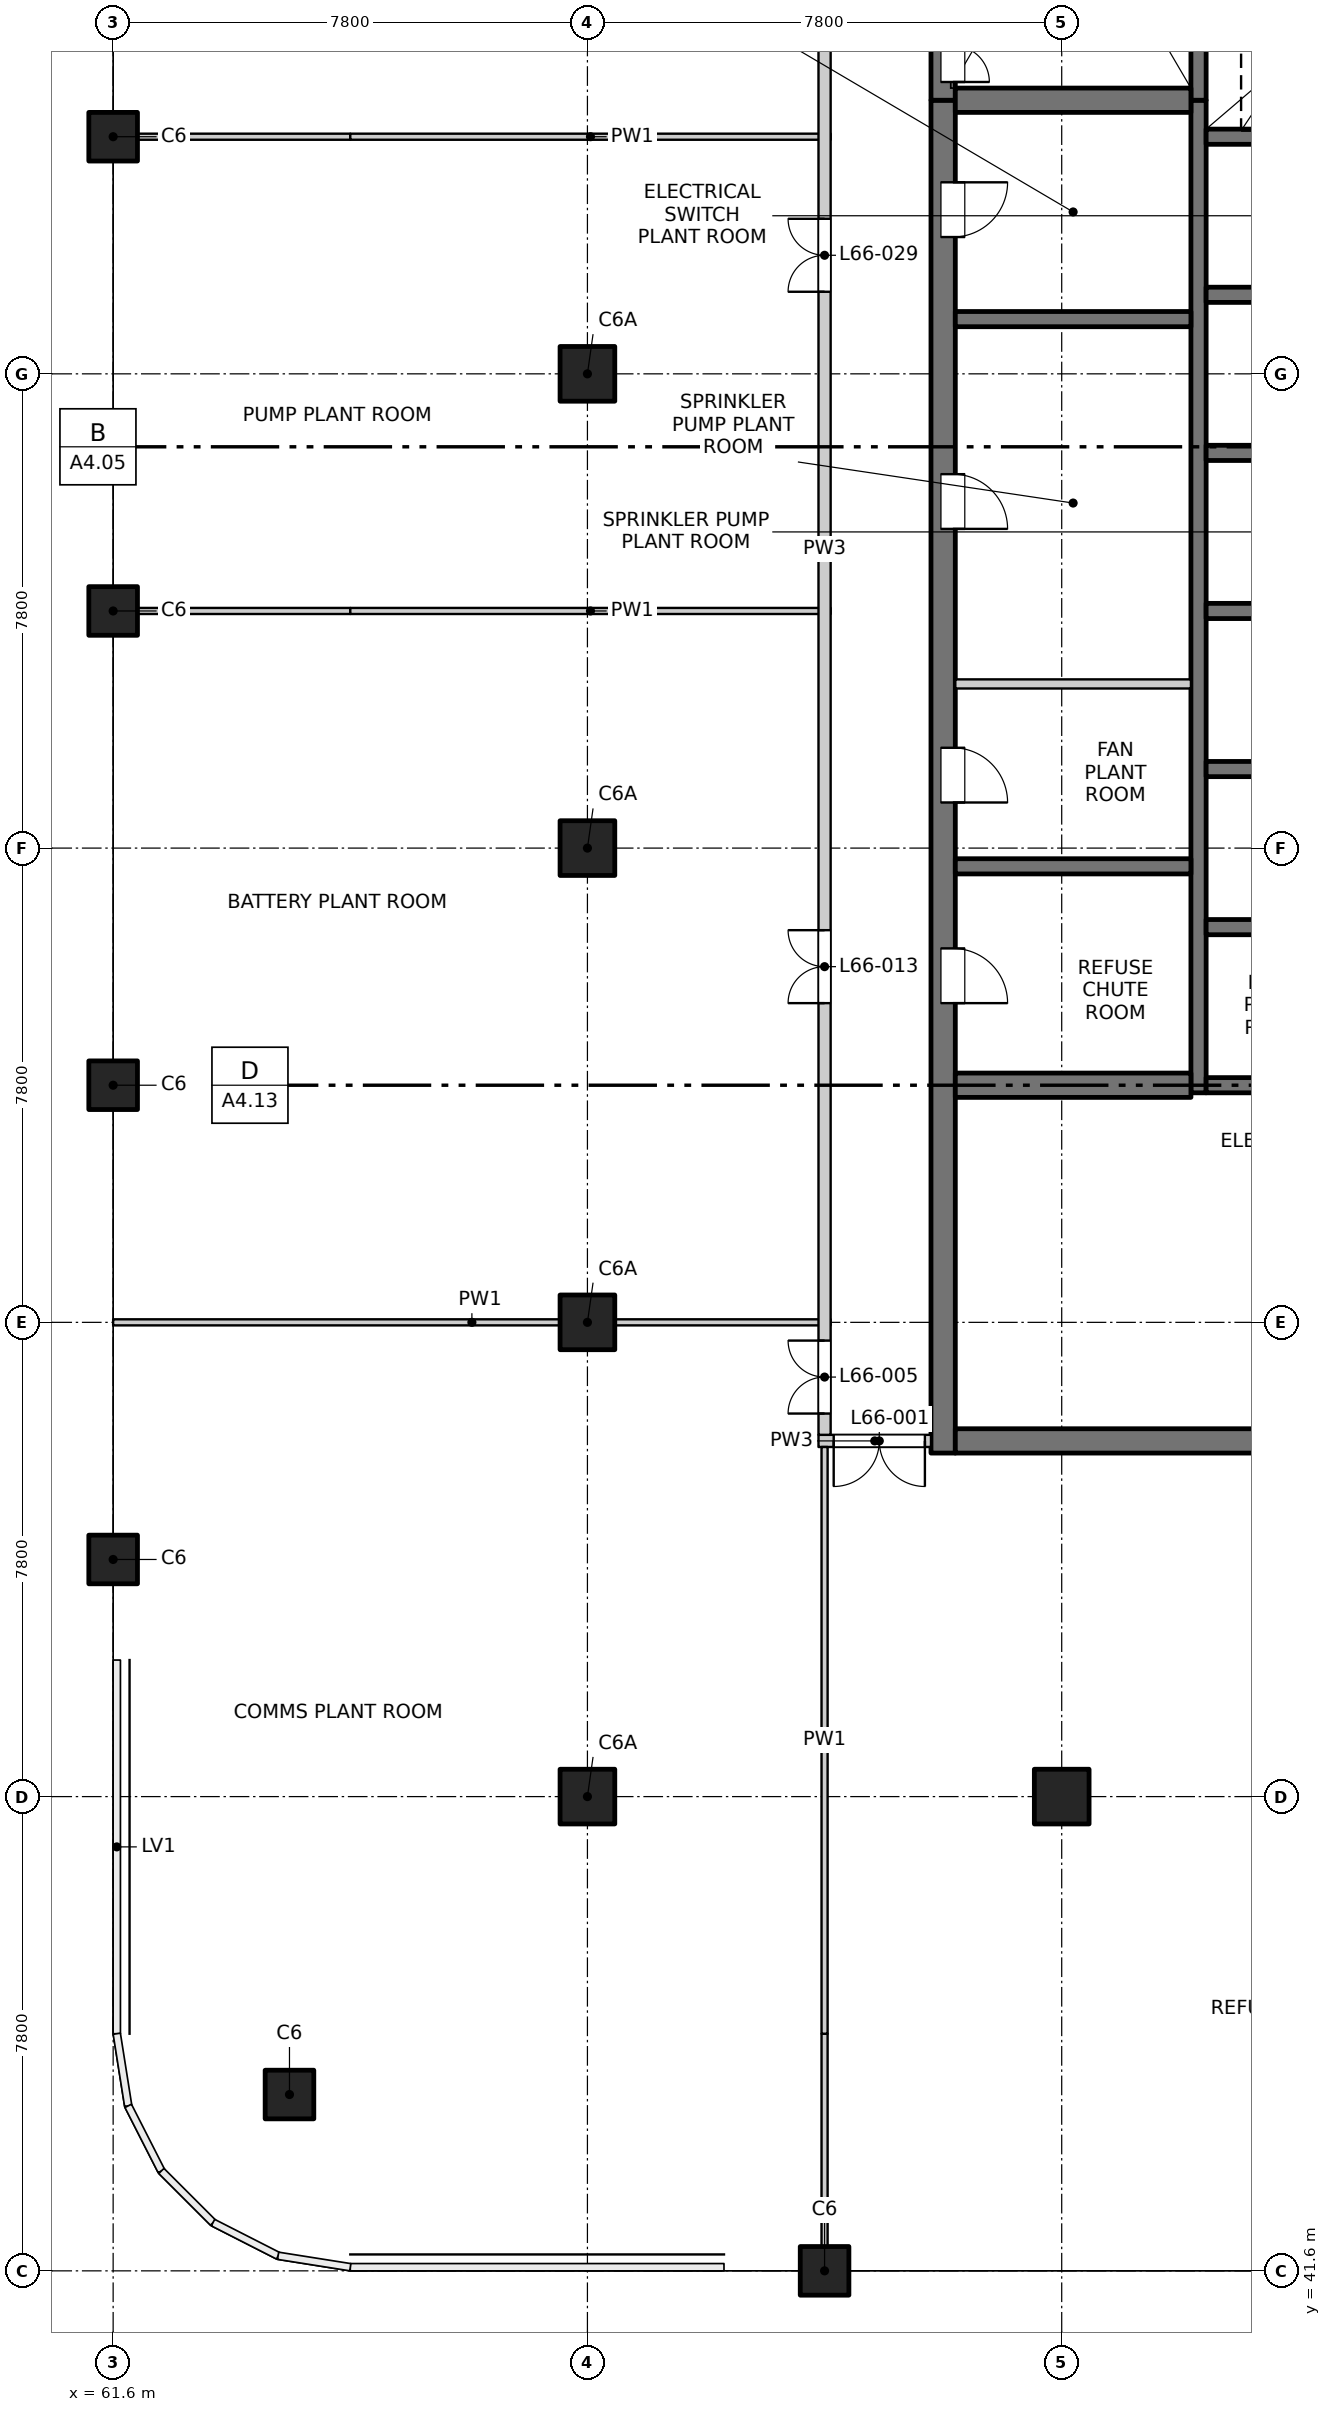
"""IFC4 building model, lengths in metres.
Left out: names, types, materials, properties, quantities, classifications, styles, units other than length and angle.
Written with IfcOpenShell. Run it as: python <this file> out.ifc"""

import sys

from ifc_helpers import new_model, si_unit, direction, frame, frame_2d, origin, origin_2d, place, context, subcontext, project, spatial, rectangle, extrude, element, fill, save


model = new_model("IFC4")
c1 = context("Model", 3, precision=1e-05, world=origin(), true_north=direction((0.0, 1.0)))
c2 = subcontext(c1, "Body", "Model", "MODEL_VIEW")
j1 = project(units=[si_unit("LENGTHUNIT", "METRE"), si_unit("PLANEANGLEUNIT", "RADIAN")], contexts=[c1])
p1 = place(None, origin())
s1 = spatial("IfcSite", under=j1, at=p1, CompositionType="ELEMENT")
p2 = place(p1, origin())
s2 = spatial("IfcBuilding", under=s1, at=p2, CompositionType="ELEMENT")
p3 = place(p2, frame((0.0, 0.0, 241.5)))
s3 = spatial("IfcBuildingStorey", under=s2, at=p3, CompositionType="ELEMENT", Elevation=241.5)
for number, where, z_axis, x_axis in (
    (1, (64.5, 44.5, -0.3), (0.0, 0.0, 1.0), (1.0, 0.0, 0.0)),
    (2, (61.6, 53.3, -0.3), (0.0, 0.0, 1.0), (1.0, 0.0, 0.0)),
    (3, (73.3, 41.6, -0.3), (0.0, 0.0, 1.0), (1.0, 0.0, 0.0)),
    (4, (61.6, 61.1, -0.3), (0.0, 0.0, 1.0), (1.0, 0.0, 0.0)),
    (5, (61.6, 68.9, -0.3), (0.0, 0.0, 1.0), (1.0, 0.0, 0.0)),
    (6, (61.6, 76.7, -0.3), (0.0, 0.0, 1.0), (1.0, 0.0, 0.0)),
):
    element("IfcColumn", number, at=place(p3, frame(where, z_axis=z_axis, x_axis=x_axis)), inside=s3, PredefinedType="COLUMN", context=c2, shape_type="SweptSolid", body=[
        extrude(rectangle(XDim=0.8, YDim=0.8, at=origin_2d()), origin(), (0.0, 0.0, 1.0), 4.5),
    ])
for number, where, z_axis, x_axis in (
    (7, (69.4, 49.4, -0.3), (0.0, 0.0, 1.0), (1.0, 0.0, 0.0)),
    (8, (69.4, 57.2, -0.3), (0.0, 0.0, 1.0), (1.0, 0.0, 0.0)),
    (9, (69.4, 65.0, -0.3), (0.0, 0.0, 1.0), (1.0, 0.0, 0.0)),
    (10, (69.4, 72.8, -0.3), (0.0, 0.0, 1.0), (1.0, 0.0, 0.0)),
    (11, (77.2, 49.4, -0.3), (0.0, 0.0, 1.0), (1.0, 0.0, 0.0)),
):
    element("IfcColumn", number, at=place(p3, frame(where, z_axis=z_axis, x_axis=x_axis)), inside=s3, PredefinedType="COLUMN", context=c2, shape_type="SweptSolid", body=[
        extrude(rectangle(XDim=0.9, YDim=0.9, at=origin_2d()), origin(), (0.0, 0.0, 1.0), 4.5),
    ])
p4 = place(p3, frame((75.25, 55.05, -0.3), z_axis=(0.0, 0.0, 1.0), x_axis=(0.0, 1.0, 0.0)))
e12 = element("IfcWall", 12, at=p4, inside=s3, PredefinedType="SOLIDWALL", context=c2, shape_type="SweptSolid", body=[
    extrude(rectangle(XDim=22.25, YDim=0.4, at=frame_2d((11.125, 0.0))), origin(), (0.0, 0.0, 1.0), 4.5),
])
p5 = place(p4, frame((7.4, 0.0, 0.3)))
e13 = element("IfcOpeningElement", 13, at=p5, cuts=e12, PredefinedType="OPENING", context=c2, shape_type="SweptSolid", body=[
    extrude(rectangle(XDim=0.9, YDim=2.1, at=frame_2d((0.45, 1.05))), frame((0.0, 0.21, 0.0), z_axis=(0.0, -1.0, 0.0), x_axis=(1.0, 0.0, 0.0)), (0.0, 0.0, 1.0), 0.42),
])
p6 = place(p4, frame((10.7, 0.0, 0.3)))
e14 = element("IfcOpeningElement", 14, at=p6, cuts=e12, PredefinedType="OPENING", context=c2, shape_type="SweptSolid", body=[
    extrude(rectangle(XDim=0.9, YDim=2.1, at=frame_2d((0.45, 1.05))), frame((0.0, 0.21, 0.0), z_axis=(0.0, -1.0, 0.0), x_axis=(1.0, 0.0, 0.0)), (0.0, 0.0, 1.0), 0.42),
])
p7 = place(p4, frame((15.2, 0.0, 0.3)))
e15 = element("IfcOpeningElement", 15, at=p7, cuts=e12, PredefinedType="OPENING", context=c2, shape_type="SweptSolid", body=[
    extrude(rectangle(XDim=0.9, YDim=2.1, at=frame_2d((0.45, 1.05))), frame((0.0, 0.21, 0.0), z_axis=(0.0, -1.0, 0.0), x_axis=(1.0, 0.0, 0.0)), (0.0, 0.0, 1.0), 0.42),
])
p8 = place(p4, frame((20.0, 0.0, 0.3)))
e16 = element("IfcOpeningElement", 16, at=p8, cuts=e12, PredefinedType="OPENING", context=c2, shape_type="SweptSolid", body=[
    extrude(rectangle(XDim=0.9, YDim=2.1, at=frame_2d((0.45, 1.05))), frame((0.0, 0.21, 0.0), z_axis=(0.0, -1.0, 0.0), x_axis=(1.0, 0.0, 0.0)), (0.0, 0.0, 1.0), 0.42),
])
p9 = place(p3, frame((75.25, 77.3, -0.3), z_axis=(0.0, 0.0, 1.0), x_axis=(0.0, 1.0, 0.0)))
e17 = element("IfcWall", 17, at=p9, inside=s3, PredefinedType="SOLIDWALL", context=c2, shape_type="SweptSolid", body=[
    extrude(rectangle(XDim=7.4, YDim=0.4, at=frame_2d((3.7, 0.0))), origin(), (0.0, 0.0, 1.0), 4.5),
])
p10 = place(p9, frame((0.3, 0.0, 0.3)))
e18 = element("IfcOpeningElement", 18, at=p10, cuts=e17, PredefinedType="OPENING", context=c2, shape_type="SweptSolid", body=[
    extrude(rectangle(XDim=1.2, YDim=2.1, at=frame_2d((0.6, 1.05))), frame((0.0, 0.21, 0.0), z_axis=(0.0, -1.0, 0.0), x_axis=(1.0, 0.0, 0.0)), (0.0, 0.0, 1.0), 0.42),
])
p11 = place(p3, frame((75.45, 55.25, -0.3), z_axis=(0.0, 0.0, 1.0), x_axis=(1.0, 0.0, 0.0)))
e19 = element("IfcWall", 19, at=p11, inside=s3, PredefinedType="SOLIDWALL", context=c2, shape_type="SweptSolid", body=[
    extrude(rectangle(XDim=19.1, YDim=0.4, at=frame_2d((9.55, 0.0))), origin(), (0.0, 0.0, 1.0), 4.5),
])
p12 = place(p11, frame((7.3, 0.0, 0.3)))
e20 = element("IfcOpeningElement", 20, at=p12, cuts=e19, PredefinedType="OPENING", context=c2, shape_type="SweptSolid", body=[
    extrude(rectangle(XDim=1.5, YDim=2.1, at=frame_2d((0.75, 1.05))), frame((0.0, 0.21, 0.0), z_axis=(0.0, -1.0, 0.0), x_axis=(1.0, 0.0, 0.0)), (0.0, 0.0, 1.0), 0.42),
])
p13 = place(p3, frame((79.45, 60.975, -0.3), z_axis=(0.0, 0.0, 1.0), x_axis=(0.0, 1.0, 0.0)))
e21 = element("IfcWall", 21, at=p13, inside=s3, PredefinedType="SOLIDWALL", context=c2, shape_type="SweptSolid", body=[
    extrude(rectangle(XDim=16.325, YDim=0.25, at=frame_2d((8.163, 0.0))), origin(), (0.0, 0.0, 1.0), 4.5),
])
p14 = place(p3, frame((79.45, 77.3, -0.3), z_axis=(0.0, 0.0, 1.0), x_axis=(0.0, 1.0, 0.0)))
e22 = element("IfcWall", 22, at=p14, inside=s3, PredefinedType="SOLIDWALL", context=c2, shape_type="SweptSolid", body=[
    extrude(rectangle(XDim=7.0, YDim=0.25, at=frame_2d((3.5, 0.0))), origin(), (0.0, 0.0, 1.0), 4.5),
])
for number, where, z_axis, x_axis in (
    (23, (79.575, 61.1, -0.3), (0.0, 0.0, 1.0), (1.0, 0.0, 0.0)),
    (24, (79.575, 63.7, -0.3), (0.0, 0.0, 1.0), (1.0, 0.0, 0.0)),
    (25, (79.575, 66.3, -0.3), (0.0, 0.0, 1.0), (1.0, 0.0, 0.0)),
    (26, (79.575, 68.9, -0.3), (0.0, 0.0, 1.0), (1.0, 0.0, 0.0)),
    (27, (79.575, 71.5, -0.3), (0.0, 0.0, 1.0), (1.0, 0.0, 0.0)),
    (28, (79.575, 74.1, -0.3), (0.0, 0.0, 1.0), (1.0, 0.0, 0.0)),
    (29, (79.575, 76.7, -0.3), (0.0, 0.0, 1.0), (1.0, 0.0, 0.0)),
):
    element("IfcWall", number, at=place(p3, frame(where, z_axis=z_axis, x_axis=x_axis)), inside=s3, PredefinedType="SOLIDWALL", context=c2, shape_type="SweptSolid", body=[
        extrude(rectangle(XDim=3.0, YDim=0.25, at=frame_2d((1.5, 0.0))), origin(), (0.0, 0.0, 1.0), 4.5),
    ])
p15 = place(p3, frame((75.45, 61.1, -0.3), z_axis=(0.0, 0.0, 1.0), x_axis=(1.0, 0.0, 0.0)))
e30 = element("IfcWall", 30, at=p15, inside=s3, PredefinedType="SOLIDWALL", context=c2, shape_type="SweptSolid", body=[
    extrude(rectangle(XDim=3.875, YDim=0.4, at=frame_2d((1.938, 0.0))), origin(), (0.0, 0.0, 1.0), 4.5),
])
for number, where, z_axis, x_axis in (
    (31, (75.45, 64.7, -0.3), (0.0, 0.0, 1.0), (1.0, 0.0, 0.0)),
    (32, (75.45, 73.7, -0.3), (0.0, 0.0, 1.0), (1.0, 0.0, 0.0)),
):
    element("IfcWall", number, at=place(p3, frame(where, z_axis=z_axis, x_axis=x_axis)), inside=s3, PredefinedType="SOLIDWALL", context=c2, shape_type="SweptSolid", body=[
        extrude(rectangle(XDim=3.875, YDim=0.25, at=frame_2d((1.938, 0.0))), origin(), (0.0, 0.0, 1.0), 4.5),
    ])
p16 = place(p3, frame((75.45, 77.3, -0.3), z_axis=(0.0, 0.0, 1.0), x_axis=(1.0, 0.0, 0.0)))
e33 = element("IfcWall", 33, at=p16, inside=s3, PredefinedType="SOLIDWALL", context=c2, shape_type="SweptSolid", body=[
    extrude(rectangle(XDim=3.875, YDim=0.4, at=frame_2d((1.938, 0.0))), origin(), (0.0, 0.0, 1.0), 4.5),
])
p17 = place(p3, frame((73.2, 55.25, 0.0), z_axis=(0.0, 0.0, 1.0), x_axis=(1.0, 0.0, 0.0)))
e34 = element("IfcWall", 34, at=p17, inside=s3, PredefinedType="PARTITIONING", context=c2, shape_type="SweptSolid", body=[
    extrude(rectangle(XDim=1.85, YDim=0.2, at=frame_2d((0.925, 0.0))), origin(), (0.0, 0.0, 1.0), 4.2),
])
p18 = place(p17, frame((0.25, 0.0, 0.0)))
e35 = element("IfcOpeningElement", 35, at=p18, cuts=e34, PredefinedType="OPENING", context=c2, shape_type="SweptSolid", body=[
    extrude(rectangle(XDim=1.5, YDim=2.1, at=frame_2d((0.75, 1.05))), frame((0.0, 0.11, 0.0), z_axis=(0.0, -1.0, 0.0), x_axis=(1.0, 0.0, 0.0)), (0.0, 0.0, 1.0), 0.22),
])
p19 = place(p3, frame((61.6, 57.2, 0.0), z_axis=(0.0, 0.0, 1.0), x_axis=(1.0, 0.0, 0.0)))
e36 = element("IfcWall", 36, at=p19, inside=s3, PredefinedType="PARTITIONING", context=c2, shape_type="SweptSolid", body=[
    extrude(rectangle(XDim=11.8, YDim=0.1, at=frame_2d((5.9, 0.0))), origin(), (0.0, 0.0, 1.0), 4.2),
])
p20 = place(p3, frame((75.45, 67.7, 0.0), z_axis=(0.0, 0.0, 1.0), x_axis=(1.0, 0.0, 0.0)))
e37 = element("IfcWall", 37, at=p20, inside=s3, PredefinedType="PARTITIONING", context=c2, shape_type="SweptSolid", body=[
    extrude(rectangle(XDim=3.875, YDim=0.15, at=frame_2d((1.938, 0.0))), origin(), (0.0, 0.0, 1.0), 4.2),
])
p21 = place(p3, frame((61.6, 68.9, 0.0), z_axis=(0.0, 0.0, 1.0), x_axis=(1.0, 0.0, 0.0)))
e38 = element("IfcWall", 38, at=p21, inside=s3, PredefinedType="PARTITIONING", context=c2, shape_type="SweptSolid", body=[
    extrude(rectangle(XDim=3.9, YDim=0.1, at=frame_2d((1.95, 0.0))), origin(), (0.0, 0.0, 1.0), 2.6),
])
p22 = place(p3, frame((65.5, 68.9, 0.0), z_axis=(0.0, 0.0, 1.0), x_axis=(1.0, 0.0, 0.0)))
e39 = element("IfcWall", 39, at=p22, inside=s3, PredefinedType="PARTITIONING", context=c2, shape_type="SweptSolid", body=[
    extrude(rectangle(XDim=7.9, YDim=0.1, at=frame_2d((3.95, 0.0))), origin(), (0.0, 0.0, 1.0), 3.6),
])
p23 = place(p3, frame((61.6, 76.7, 0.0), z_axis=(0.0, 0.0, 1.0), x_axis=(1.0, 0.0, 0.0)))
e40 = element("IfcWall", 40, at=p23, inside=s3, PredefinedType="PARTITIONING", context=c2, shape_type="SweptSolid", body=[
    extrude(rectangle(XDim=3.9, YDim=0.1, at=frame_2d((1.95, 0.0))), origin(), (0.0, 0.0, 1.0), 2.6),
])
p24 = place(p3, frame((65.5, 76.7, 0.0), z_axis=(0.0, 0.0, 1.0), x_axis=(1.0, 0.0, 0.0)))
e41 = element("IfcWall", 41, at=p24, inside=s3, PredefinedType="PARTITIONING", context=c2, shape_type="SweptSolid", body=[
    extrude(rectangle(XDim=7.9, YDim=0.1, at=frame_2d((3.95, 0.0))), origin(), (0.0, 0.0, 1.0), 3.6),
])
p25 = place(p3, frame((73.3, 41.6, 0.0), z_axis=(0.0, 0.0, 1.0), x_axis=(0.0, 1.0, 0.0)))
e42 = element("IfcWall", 42, at=p25, inside=s3, PredefinedType="PARTITIONING", context=c2, shape_type="SweptSolid", body=[
    extrude(rectangle(XDim=3.9, YDim=0.1, at=frame_2d((1.95, 0.0))), origin(), (0.0, 0.0, 1.0), 2.6),
])
p26 = place(p3, frame((73.3, 45.5, 0.0), z_axis=(0.0, 0.0, 1.0), x_axis=(0.0, 1.0, 0.0)))
e43 = element("IfcWall", 43, at=p26, inside=s3, PredefinedType="PARTITIONING", context=c2, shape_type="SweptSolid", body=[
    extrude(rectangle(XDim=9.65, YDim=0.1, at=frame_2d((4.825, 0.0))), origin(), (0.0, 0.0, 1.0), 4.2),
])
p27 = place(p3, frame((73.3, 55.35, 0.0), z_axis=(0.0, 0.0, 1.0), x_axis=(0.0, 1.0, 0.0)))
e44 = element("IfcWall", 44, at=p27, inside=s3, PredefinedType="PARTITIONING", context=c2, shape_type="SweptSolid", body=[
    extrude(rectangle(XDim=29.15, YDim=0.2, at=frame_2d((14.575, 0.0))), origin(), (0.0, 0.0, 1.0), 4.2),
])
p28 = place(p27, frame((0.35, 0.0, 0.0)))
e45 = element("IfcOpeningElement", 45, at=p28, cuts=e44, PredefinedType="OPENING", context=c2, shape_type="SweptSolid", body=[
    extrude(rectangle(XDim=1.2, YDim=2.1, at=frame_2d((0.6, 1.05))), frame((0.0, 0.11, 0.0), z_axis=(0.0, -1.0, 0.0), x_axis=(1.0, 0.0, 0.0)), (0.0, 0.0, 1.0), 0.22),
])
p29 = place(p27, frame((7.1, 0.0, 0.0)))
e46 = element("IfcOpeningElement", 46, at=p29, cuts=e44, PredefinedType="OPENING", context=c2, shape_type="SweptSolid", body=[
    extrude(rectangle(XDim=1.2, YDim=2.1, at=frame_2d((0.6, 1.05))), frame((0.0, 0.11, 0.0), z_axis=(0.0, -1.0, 0.0), x_axis=(1.0, 0.0, 0.0)), (0.0, 0.0, 1.0), 0.22),
])
p30 = place(p27, frame((18.8, 0.0, 0.0)))
e47 = element("IfcOpeningElement", 47, at=p30, cuts=e44, PredefinedType="OPENING", context=c2, shape_type="SweptSolid", body=[
    extrude(rectangle(XDim=1.2, YDim=2.1, at=frame_2d((0.6, 1.05))), frame((0.0, 0.11, 0.0), z_axis=(0.0, -1.0, 0.0), x_axis=(1.0, 0.0, 0.0)), (0.0, 0.0, 1.0), 0.22),
])
p31 = place(p27, frame((26.6, 0.0, 0.0)))
e48 = element("IfcOpeningElement", 48, at=p31, cuts=e44, PredefinedType="OPENING", context=c2, shape_type="SweptSolid", body=[
    extrude(rectangle(XDim=1.2, YDim=2.1, at=frame_2d((0.6, 1.05))), frame((0.0, 0.11, 0.0), z_axis=(0.0, -1.0, 0.0), x_axis=(1.0, 0.0, 0.0)), (0.0, 0.0, 1.0), 0.22),
])
p32 = place(p18, origin())
e49 = element("IfcDoor", 49, at=p32, inside=s3, OperationType="DOUBLE_DOOR_SINGLE_SWING", PredefinedType="DOOR", context=c2, shape_type="SweptSolid", body=[
    extrude(rectangle(XDim=1.5, YDim=2.1, at=frame_2d((0.75, 1.05))), frame((0.0, 0.025, 0.0), z_axis=(0.0, -1.0, 0.0), x_axis=(1.0, 0.0, 0.0)), (0.0, 0.0, 1.0), 0.05),
])
fill(e35, e49)
p33 = place(p28, origin())
e50 = element("IfcDoor", 50, at=p33, inside=s3, OperationType="DOUBLE_DOOR_SINGLE_SWING", PredefinedType="DOOR", context=c2, shape_type="SweptSolid", body=[
    extrude(rectangle(XDim=1.2, YDim=2.1, at=frame_2d((0.6, 1.05))), frame((0.0, 0.025, 0.0), z_axis=(0.0, -1.0, 0.0), x_axis=(1.0, 0.0, 0.0)), (0.0, 0.0, 1.0), 0.05),
])
fill(e45, e50)
p34 = place(p5, origin())
e51 = element("IfcDoor", 51, at=p34, inside=s3, OperationType="SINGLE_SWING_RIGHT", PredefinedType="DOOR", context=c2, shape_type="SweptSolid", body=[
    extrude(rectangle(XDim=0.9, YDim=2.1, at=frame_2d((0.45, 1.05))), frame((0.0, -0.135, 0.0), z_axis=(0.0, -1.0, 0.0), x_axis=(1.0, 0.0, 0.0)), (0.0, 0.0, 1.0), 0.05),
])
fill(e13, e51)
p35 = place(p29, origin())
e52 = element("IfcDoor", 52, at=p35, inside=s3, OperationType="DOUBLE_DOOR_SINGLE_SWING", PredefinedType="DOOR", context=c2, shape_type="SweptSolid", body=[
    extrude(rectangle(XDim=1.2, YDim=2.1, at=frame_2d((0.6, 1.05))), frame((0.0, 0.025, 0.0), z_axis=(0.0, -1.0, 0.0), x_axis=(1.0, 0.0, 0.0)), (0.0, 0.0, 1.0), 0.05),
])
fill(e46, e52)
p36 = place(p6, origin())
e53 = element("IfcDoor", 53, at=p36, inside=s3, OperationType="SINGLE_SWING_RIGHT", PredefinedType="DOOR", context=c2, shape_type="SweptSolid", body=[
    extrude(rectangle(XDim=0.9, YDim=2.1, at=frame_2d((0.45, 1.05))), frame((0.0, -0.135, 0.0), z_axis=(0.0, -1.0, 0.0), x_axis=(1.0, 0.0, 0.0)), (0.0, 0.0, 1.0), 0.05),
])
fill(e14, e53)
p37 = place(p7, origin())
e54 = element("IfcDoor", 54, at=p37, inside=s3, OperationType="SINGLE_SWING_RIGHT", PredefinedType="DOOR", context=c2, shape_type="SweptSolid", body=[
    extrude(rectangle(XDim=0.9, YDim=2.1, at=frame_2d((0.45, 1.05))), frame((0.0, -0.135, 0.0), z_axis=(0.0, -1.0, 0.0), x_axis=(1.0, 0.0, 0.0)), (0.0, 0.0, 1.0), 0.05),
])
fill(e15, e54)
p38 = place(p30, origin())
e55 = element("IfcDoor", 55, at=p38, inside=s3, OperationType="DOUBLE_DOOR_SINGLE_SWING", PredefinedType="DOOR", context=c2, shape_type="SweptSolid", body=[
    extrude(rectangle(XDim=1.2, YDim=2.1, at=frame_2d((0.6, 1.05))), frame((0.0, 0.025, 0.0), z_axis=(0.0, -1.0, 0.0), x_axis=(1.0, 0.0, 0.0)), (0.0, 0.0, 1.0), 0.05),
])
fill(e47, e55)
p39 = place(p8, origin())
e56 = element("IfcDoor", 56, at=p39, inside=s3, OperationType="SINGLE_SWING_LEFT", PredefinedType="DOOR", context=c2, shape_type="SweptSolid", body=[
    extrude(rectangle(XDim=0.9, YDim=2.1, at=frame_2d((0.45, 1.05))), frame((0.0, -0.135, 0.0), z_axis=(0.0, -1.0, 0.0), x_axis=(1.0, 0.0, 0.0)), (0.0, 0.0, 1.0), 0.05),
])
fill(e16, e56)
p40 = place(p10, origin())
e57 = element("IfcDoor", 57, at=p40, inside=s3, OperationType="DOUBLE_DOOR_SINGLE_SWING", PredefinedType="DOOR", context=c2, shape_type="SweptSolid", body=[
    extrude(rectangle(XDim=1.2, YDim=2.1, at=frame_2d((0.6, 1.05))), frame((0.0, -0.135, 0.0), z_axis=(0.0, -1.0, 0.0), x_axis=(1.0, 0.0, 0.0)), (0.0, 0.0, 1.0), 0.05),
])
fill(e18, e57)
save(model, sys.argv[1])
